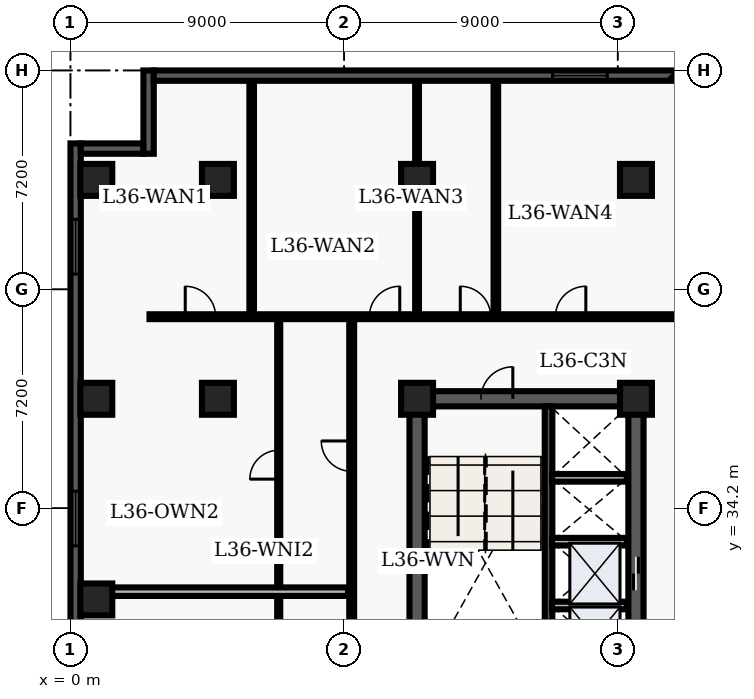
"""IFC4 building model, lengths in metres.
Left out: names, types, materials, properties, quantities, classifications, styles, units other than length and angle.
Written with IfcOpenShell. Run it as: python <this file> out.ifc"""

import sys

from ifc_helpers import new_model, entity, si_unit, converted_unit, direction, frame, origin_with_axes, origin_2d_with_axis, place, context, subcontext, project, spatial, polyline, rectangle, outline, extrude, element, fill, save


model = new_model("IFC4")
c1 = context("Model", 3, precision=1e-05, world=origin_with_axes(), true_north=direction((0.0, 1.0)))
c2 = subcontext(c1, "Body", "Model", "MODEL_VIEW")
j1 = project(units=[si_unit("LENGTHUNIT", "METRE"), converted_unit("PLANEANGLEUNIT", "DEGREE", entity("IfcPlaneAngleMeasure", 0.017), si_unit("PLANEANGLEUNIT", "RADIAN"), dimensions=[0, 0, 0, 0, 0, 0, 0])], contexts=[c1])
p1 = place(None, origin_with_axes())
s1 = spatial("IfcSite", under=j1, at=p1, CompositionType="ELEMENT")
p2 = place(p1, origin_with_axes())
s2 = spatial("IfcBuilding", under=s1, at=p2, CompositionType="ELEMENT")
p3 = place(p2, frame((0.0, 0.0, 148.5), z_axis=(0.0, 0.0, 1.0), x_axis=(1.0, 0.0, 0.0)))
s3 = spatial("IfcBuildingStorey", under=s2, at=p3, CompositionType="ELEMENT", Elevation=148.5)
p4 = place(p3, frame((11.4, 10.8, 0.0), z_axis=(0.0, 0.0, 1.0), x_axis=(0.0, 1.0, 0.0)))
e1 = element("IfcWall", 1, at=p4, inside=s3, PredefinedType="SHEAR", context=c2, shape_type="SweptSolid", body=[
    extrude(outline(polyline([(0.0, -0.25), (27.0, -0.25), (27.0, 0.25), (0.0, 0.25), (0.0, -0.25)])), origin_with_axes(), (0.0, 0.0, 1.0), 3.66),
])
p5 = place(p3, frame((11.4, 37.8, 0.0), z_axis=(0.0, 0.0, 1.0), x_axis=(1.0, 0.0, 0.0)))
e2 = element("IfcWall", 2, at=p5, inside=s3, PredefinedType="SHEAR", context=c2, shape_type="SweptSolid", body=[
    extrude(outline(polyline([(0.0, -0.25), (7.2, -0.25), (7.2, 0.25), (0.0, 0.25), (0.0, -0.25)])), origin_with_axes(), (0.0, 0.0, 1.0), 3.66),
])
p6 = place(p5, frame((2.625, 0.0, 0.0), z_axis=(0.0, 0.0, 1.0), x_axis=(1.0, 0.0, 0.0)))
e3 = element("IfcOpeningElement", 3, at=p6, cuts=e2, PredefinedType="OPENING", context=c2, shape_type="SweptSolid", body=[
    extrude(rectangle(XDim=1.05, YDim=0.52, at=origin_2d_with_axis()), origin_with_axes(), (0.0, 0.0, 1.0), 2.15),
])
p7 = place(p3, frame((18.6, 24.3, 0.0), z_axis=(0.0, 0.0, 1.0), x_axis=(0.0, 1.0, 0.0)))
e4 = element("IfcWall", 4, at=p7, inside=s3, PredefinedType="SHEAR", context=c2, shape_type="SweptSolid", body=[
    extrude(outline(polyline([(0.0, -0.25), (13.5, -0.25), (13.5, 0.25), (0.0, 0.25), (0.0, -0.25)])), origin_with_axes(), (0.0, 0.0, 1.0), 3.66),
])
p8 = place(p7, frame((5.65, 0.0, 0.0), z_axis=(0.0, 0.0, 1.0), x_axis=(1.0, 0.0, 0.0)))
e5 = element("IfcOpeningElement", 5, at=p8, cuts=e4, PredefinedType="OPENING", context=c2, shape_type="SweptSolid", body=[
    extrude(rectangle(XDim=1.1, YDim=0.52, at=origin_2d_with_axis()), origin_with_axes(), (0.0, 0.0, 1.0), 2.15),
])
p9 = place(p7, frame((7.75, 0.0, 0.0), z_axis=(0.0, 0.0, 1.0), x_axis=(1.0, 0.0, 0.0)))
e6 = element("IfcOpeningElement", 6, at=p9, cuts=e4, PredefinedType="OPENING", context=c2, shape_type="SweptSolid", body=[
    extrude(rectangle(XDim=1.1, YDim=0.52, at=origin_2d_with_axis()), origin_with_axes(), (0.0, 0.0, 1.0), 2.15),
])
p10 = place(p3, frame((15.725, 28.9, 0.0), z_axis=(0.0, 0.0, 1.0), x_axis=(0.0, 1.0, 0.0)))
e7 = element("IfcWall", 7, at=p10, inside=s3, PredefinedType="SHEAR", context=c2, shape_type="SweptSolid", body=[
    extrude(outline(polyline([(0.0, -0.125), (8.65, -0.125), (8.65, 0.125), (0.0, 0.125), (0.0, -0.125)])), origin_with_axes(), (0.0, 0.0, 1.0), 3.66),
])
for number, where, z_axis, x_axis in (
    (8, (11.4, 37.8, 0.0), (0.0, 0.0, 1.0), (1.0, 0.0, 0.0)),
    (9, (11.4, 45.0, 0.0), (0.0, 0.0, 1.0), (1.0, 0.0, 0.0)),
    (10, (18.6, 37.8, 0.0), (0.0, 0.0, 1.0), (1.0, 0.0, 0.0)),
    (11, (18.6, 45.0, 0.0), (0.0, 0.0, 1.0), (1.0, 0.0, 0.0)),
    (12, (4.85, 37.8, 0.0), (0.0, 0.0, 1.0), (1.0, 0.0, 0.0)),
    (13, (4.85, 45.0, 0.0), (0.0, 0.0, 1.0), (1.0, 0.0, 0.0)),
    (14, (0.85, 31.2, 0.0), (0.0, 0.0, 1.0), (1.0, 0.0, 0.0)),
    (15, (0.85, 37.8, 0.0), (0.0, 0.0, 1.0), (1.0, 0.0, 0.0)),
    (16, (0.85, 45.0, 0.0), (0.0, 0.0, 1.0), (1.0, 0.0, 0.0)),
):
    element("IfcColumn", number, at=place(p3, frame(where, z_axis=z_axis, x_axis=x_axis)), inside=s3, PredefinedType="COLUMN", context=c2, shape_type="SweptSolid", body=[
        extrude(rectangle(XDim=1.05, YDim=1.05, at=origin_2d_with_axis()), origin_with_axes(), (0.0, 0.0, 1.0), 3.9),
    ])
for number, where, z_axis, x_axis in (
    (17, (15.84, 31.0, 0.0), (0.0, 0.0, 1.0), (1.0, 0.0, 0.0)),
    (18, (15.84, 33.1, 0.0), (0.0, 0.0, 1.0), (1.0, 0.0, 0.0)),
    (19, (15.84, 35.2, 0.0), (0.0, 0.0, 1.0), (1.0, 0.0, 0.0)),
):
    element("IfcWall", number, at=place(p3, frame(where, z_axis=z_axis, x_axis=x_axis)), inside=s3, PredefinedType="SOLIDWALL", context=c2, shape_type="SweptSolid", body=[
        extrude(outline(polyline([(0.0, -0.125), (2.46, -0.125), (2.46, 0.125), (0.0, 0.125), (0.0, -0.125)])), origin_with_axes(), (0.0, 0.0, 1.0), 2.7),
    ])
p11 = place(p3, frame((2.6, 40.5, 0.0), z_axis=(0.0, 0.0, 1.0), x_axis=(1.0, 0.0, 0.0)))
e20 = element("IfcWall", 20, at=p11, inside=s3, PredefinedType="PARTITIONING", context=c2, shape_type="SweptSolid", body=[
    extrude(outline(polyline([(0.0, -0.08), (19.506, -0.08), (19.506, 0.08), (0.0, 0.08), (0.0, -0.08)])), origin_with_axes(), (0.0, 0.0, 1.0), 2.7),
])
p12 = place(p11, frame((1.675, 0.0, 0.0), z_axis=(0.0, 0.0, 1.0), x_axis=(1.0, 0.0, 0.0)))
e21 = element("IfcOpeningElement", 21, at=p12, cuts=e20, PredefinedType="OPENING", context=c2, shape_type="SweptSolid", body=[
    extrude(rectangle(XDim=1.0, YDim=0.18, at=origin_2d_with_axis()), origin_with_axes(), (0.0, 0.0, 1.0), 2.15),
])
p13 = place(p11, frame((7.731, 0.0, 0.0), z_axis=(0.0, 0.0, 1.0), x_axis=(1.0, 0.0, 0.0)))
e22 = element("IfcOpeningElement", 22, at=p13, cuts=e20, PredefinedType="OPENING", context=c2, shape_type="SweptSolid", body=[
    extrude(rectangle(XDim=1.0, YDim=0.18, at=origin_2d_with_axis()), origin_with_axes(), (0.0, 0.0, 1.0), 2.15),
])
p14 = place(p11, frame((10.722, 0.0, 0.0), z_axis=(0.0, 0.0, 1.0), x_axis=(1.0, 0.0, 0.0)))
e23 = element("IfcOpeningElement", 23, at=p14, cuts=e20, PredefinedType="OPENING", context=c2, shape_type="SweptSolid", body=[
    extrude(rectangle(XDim=1.0, YDim=0.18, at=origin_2d_with_axis()), origin_with_axes(), (0.0, 0.0, 1.0), 2.15),
])
p15 = place(p11, frame((13.851, 0.0, 0.0), z_axis=(0.0, 0.0, 1.0), x_axis=(1.0, 0.0, 0.0)))
e24 = element("IfcOpeningElement", 24, at=p15, cuts=e20, PredefinedType="OPENING", context=c2, shape_type="SweptSolid", body=[
    extrude(rectangle(XDim=1.0, YDim=0.18, at=origin_2d_with_axis()), origin_with_axes(), (0.0, 0.0, 1.0), 2.15),
])
p16 = place(p3, frame((9.25, 24.4, 0.0), z_axis=(0.0, 0.0, 1.0), x_axis=(0.0, 1.0, 0.0)))
e25 = element("IfcWall", 25, at=p16, inside=s3, PredefinedType="PARTITIONING", context=c2, shape_type="SweptSolid", body=[
    extrude(outline(polyline([(0.0, -0.08), (16.1, -0.08), (16.1, 0.08), (0.0, 0.08), (0.0, -0.08)])), origin_with_axes(), (0.0, 0.0, 1.0), 2.7),
])
p17 = place(p16, frame((3.567, 0.0, 0.0), z_axis=(0.0, 0.0, 1.0), x_axis=(1.0, 0.0, 0.0)))
e26 = element("IfcOpeningElement", 26, at=p17, cuts=e25, PredefinedType="OPENING", context=c2, shape_type="SweptSolid", body=[
    extrude(rectangle(XDim=1.0, YDim=0.18, at=origin_2d_with_axis()), origin_with_axes(), (0.0, 0.0, 1.0), 2.15),
])
p18 = place(p16, frame((11.512, 0.0, 0.0), z_axis=(0.0, 0.0, 1.0), x_axis=(1.0, 0.0, 0.0)))
e27 = element("IfcOpeningElement", 27, at=p18, cuts=e25, PredefinedType="OPENING", context=c2, shape_type="SweptSolid", body=[
    extrude(rectangle(XDim=1.0, YDim=0.18, at=origin_2d_with_axis()), origin_with_axes(), (0.0, 0.0, 1.0), 2.15),
])
p19 = place(p3, frame((6.85, 24.55, 0.0), z_axis=(0.0, 0.0, 1.0), x_axis=(0.0, 1.0, 0.0)))
e28 = element("IfcWall", 28, at=p19, inside=s3, PredefinedType="PARTITIONING", context=c2, shape_type="SweptSolid", body=[
    extrude(outline(polyline([(0.0, -0.05), (15.75, -0.05), (15.75, 0.05), (0.0, 0.05), (0.0, -0.05)])), origin_with_axes(), (0.0, 0.0, 1.0), 2.7),
])
p20 = place(p19, frame((3.417, 0.0, 0.0), z_axis=(0.0, 0.0, 1.0), x_axis=(1.0, 0.0, 0.0)))
e29 = element("IfcOpeningElement", 29, at=p20, cuts=e28, PredefinedType="OPENING", context=c2, shape_type="SweptSolid", body=[
    extrude(rectangle(XDim=0.95, YDim=0.12, at=origin_2d_with_axis()), origin_with_axes(), (0.0, 0.0, 1.0), 2.15),
])
p21 = place(p19, frame((11.082, 0.0, 0.0), z_axis=(0.0, 0.0, 1.0), x_axis=(1.0, 0.0, 0.0)))
e30 = element("IfcOpeningElement", 30, at=p21, cuts=e28, PredefinedType="OPENING", context=c2, shape_type="SweptSolid", body=[
    extrude(rectangle(XDim=0.95, YDim=0.12, at=origin_2d_with_axis()), origin_with_axes(), (0.0, 0.0, 1.0), 2.15),
])
p22 = place(p3, frame((0.335, 31.455, 0.0), z_axis=(0.0, 0.0, 1.0), x_axis=(1.0, 0.0, 0.0)))
e31 = element("IfcWall", 31, at=p22, inside=s3, PredefinedType="PARTITIONING", context=c2, shape_type="SweptSolid", body=[
    extrude(outline(polyline([(0.0, -0.14), (8.795, -0.14), (8.795, 0.14), (0.0, 0.14), (0.0, -0.14)])), origin_with_axes(), (0.0, 0.0, 1.0), 2.7),
])
p23 = place(p3, frame((5.961, 40.6, 0.0), z_axis=(0.0, 0.0, 1.0), x_axis=(0.0, 1.0, 0.0)))
e32 = element("IfcWall", 32, at=p23, inside=s3, PredefinedType="PARTITIONING", context=c2, shape_type="SweptSolid", body=[
    extrude(outline(polyline([(0.0, -0.075), (7.665, -0.075), (7.665, 0.075), (0.0, 0.075), (0.0, -0.075)])), origin_with_axes(), (0.0, 0.0, 1.0), 2.7),
])
p24 = place(p3, frame((11.4, 40.6, 0.0), z_axis=(0.0, 0.0, 1.0), x_axis=(0.0, 1.0, 0.0)))
e33 = element("IfcWall", 33, at=p24, inside=s3, PredefinedType="PARTITIONING", context=c2, shape_type="SweptSolid", body=[
    extrude(outline(polyline([(0.0, -0.062), (7.665, -0.062), (7.665, 0.062), (0.0, 0.062), (0.0, -0.062)])), origin_with_axes(), (0.0, 0.0, 1.0), 2.7),
])
p25 = place(p3, frame((13.992, 40.6, 0.0), z_axis=(0.0, 0.0, 1.0), x_axis=(0.0, 1.0, 0.0)))
e34 = element("IfcWall", 34, at=p25, inside=s3, PredefinedType="PARTITIONING", context=c2, shape_type="SweptSolid", body=[
    extrude(outline(polyline([(0.0, -0.075), (7.665, -0.075), (7.665, 0.075), (0.0, 0.075), (0.0, -0.075)])), origin_with_axes(), (0.0, 0.0, 1.0), 2.7),
])
p26 = place(p3, frame((0.17, 2.74, 0.0), z_axis=(0.0, 0.0, 1.0), x_axis=(0.0, 1.0, 0.0)))
e35 = element("IfcWall", 35, at=p26, inside=s3, PredefinedType="SOLIDWALL", context=c2, shape_type="SweptSolid", body=[
    extrude(outline(polyline([(0.0, -0.17), (43.46, -0.17), (43.46, 0.17), (0.0, 0.17), (0.0, -0.17)])), origin_with_axes(), (0.0, 0.0, 1.0), 3.66),
])
p27 = place(p26, frame((2.948, 0.0, 0.45), z_axis=(0.0, 0.0, 1.0), x_axis=(1.0, 0.0, 0.0)))
e36 = element("IfcOpeningElement", 36, at=p27, cuts=e35, PredefinedType="OPENING", context=c2, shape_type="SweptSolid", body=[
    extrude(rectangle(XDim=1.8, YDim=0.36, at=origin_2d_with_axis()), origin_with_axes(), (0.0, 0.0, 1.0), 2.1),
])
p28 = place(p26, frame((12.339, 0.0, 0.45), z_axis=(0.0, 0.0, 1.0), x_axis=(1.0, 0.0, 0.0)))
e37 = element("IfcOpeningElement", 37, at=p28, cuts=e35, PredefinedType="OPENING", context=c2, shape_type="SweptSolid", body=[
    extrude(rectangle(XDim=1.8, YDim=0.36, at=origin_2d_with_axis()), origin_with_axes(), (0.0, 0.0, 1.0), 2.1),
])
p29 = place(p26, frame((26.426, 0.0, 0.45), z_axis=(0.0, 0.0, 1.0), x_axis=(1.0, 0.0, 0.0)))
e38 = element("IfcOpeningElement", 38, at=p29, cuts=e35, PredefinedType="OPENING", context=c2, shape_type="SweptSolid", body=[
    extrude(rectangle(XDim=1.8, YDim=0.36, at=origin_2d_with_axis()), origin_with_axes(), (0.0, 0.0, 1.0), 2.1),
])
p30 = place(p26, frame((31.121, 0.0, 0.45), z_axis=(0.0, 0.0, 1.0), x_axis=(1.0, 0.0, 0.0)))
e39 = element("IfcOpeningElement", 39, at=p30, cuts=e35, PredefinedType="OPENING", context=c2, shape_type="SweptSolid", body=[
    extrude(rectangle(XDim=1.8, YDim=0.36, at=origin_2d_with_axis()), origin_with_axes(), (0.0, 0.0, 1.0), 2.1),
])
p31 = place(p26, frame((40.062, 0.0, 0.45), z_axis=(0.0, 0.0, 1.0), x_axis=(1.0, 0.0, 0.0)))
e40 = element("IfcOpeningElement", 40, at=p31, cuts=e35, PredefinedType="OPENING", context=c2, shape_type="SweptSolid", body=[
    extrude(rectangle(XDim=1.8, YDim=0.36, at=origin_2d_with_axis()), origin_with_axes(), (0.0, 0.0, 1.0), 2.1),
])
p32 = place(p3, frame((0.34, 46.03, 0.0), z_axis=(0.0, 0.0, 1.0), x_axis=(1.0, 0.0, 0.0)))
e41 = element("IfcWall", 41, at=p32, inside=s3, PredefinedType="SOLIDWALL", context=c2, shape_type="SweptSolid", body=[
    extrude(outline(polyline([(0.0, -0.17), (2.06, -0.17), (2.06, 0.17), (0.0, 0.17), (0.0, -0.17)])), origin_with_axes(), (0.0, 0.0, 1.0), 3.66),
])
p33 = place(p3, frame((2.57, 45.86, 0.0), z_axis=(0.0, 0.0, 1.0), x_axis=(0.0, 1.0, 0.0)))
e42 = element("IfcWall", 42, at=p33, inside=s3, PredefinedType="SOLIDWALL", context=c2, shape_type="SweptSolid", body=[
    extrude(outline(polyline([(0.0, -0.17), (2.74, -0.17), (2.74, 0.17), (0.0, 0.17), (0.0, -0.17)])), origin_with_axes(), (0.0, 0.0, 1.0), 3.66),
])
p34 = place(p3, frame((2.74, 48.43, 0.0), z_axis=(0.0, 0.0, 1.0), x_axis=(1.0, 0.0, 0.0)))
e43 = element("IfcWall", 43, at=p34, inside=s3, PredefinedType="SOLIDWALL", context=c2, shape_type="SweptSolid", body=[
    extrude(outline(polyline([(0.0, -0.17), (17.301, -0.17), (17.301, 0.17), (0.0, 0.17), (0.0, -0.17)])), origin_with_axes(), (0.0, 0.0, 1.0), 3.66),
])
p35 = place(p34, frame((14.018, 0.0, 0.45), z_axis=(0.0, 0.0, 1.0), x_axis=(1.0, 0.0, 0.0)))
e44 = element("IfcOpeningElement", 44, at=p35, cuts=e43, PredefinedType="OPENING", context=c2, shape_type="SweptSolid", body=[
    extrude(rectangle(XDim=1.8, YDim=0.36, at=origin_2d_with_axis()), origin_with_axes(), (0.0, 0.0, 1.0), 2.1),
])
p36 = place(p3, frame((19.907, 48.494, 0.0), z_axis=(0.0, 0.0, 1.0), x_axis=(0.707107, -0.707107, 0.0)))
e45 = element("IfcWall", 45, at=p36, inside=s3, PredefinedType="SOLIDWALL", context=c2, shape_type="SweptSolid", body=[
    extrude(outline(polyline([(0.0, -0.17), (3.414, -0.17), (3.414, 0.17), (0.0, 0.17), (0.0, -0.17)])), origin_with_axes(), (0.0, 0.0, 1.0), 3.66),
])
p37 = place(p7, frame((7.75, 0.0, 0.0), z_axis=(0.0, 0.0, 1.0), x_axis=(1.0, 0.0, 0.0)))
e46 = element("IfcDoor", 46, at=p37, inside=s3, OperationType="SLIDING_TO_RIGHT", PredefinedType="DOOR", context=c2, shape_type="SweptSolid", body=[
    extrude(rectangle(XDim=1.1, YDim=0.09, at=origin_2d_with_axis()), origin_with_axes(), (0.0, 0.0, 1.0), 2.15),
])
fill(e6, e46)
p38 = place(p5, frame((2.625, 0.0, 0.0), z_axis=(0.0, 0.0, 1.0), x_axis=(1.0, 0.0, 0.0)))
e47 = element("IfcDoor", 47, at=p38, inside=s3, OperationType="SINGLE_SWING_RIGHT", PredefinedType="DOOR", context=c2, shape_type="SweptSolid", body=[
    extrude(rectangle(XDim=1.05, YDim=0.09, at=origin_2d_with_axis()), origin_with_axes(), (0.0, 0.0, 1.0), 2.15),
])
fill(e3, e47)
p39 = place(p19, frame((11.082, 0.0, 0.0), z_axis=(0.0, 0.0, 1.0), x_axis=(1.0, 0.0, 0.0)))
e48 = element("IfcDoor", 48, at=p39, inside=s3, OperationType="SINGLE_SWING_LEFT", PredefinedType="DOOR", context=c2, shape_type="SweptSolid", body=[
    extrude(rectangle(XDim=0.95, YDim=0.06, at=origin_2d_with_axis()), origin_with_axes(), (0.0, 0.0, 1.0), 2.15),
])
fill(e30, e48)
p40 = place(p16, frame((11.512, 0.0, 0.0), z_axis=(0.0, 0.0, 1.0), x_axis=(1.0, 0.0, 0.0)))
e49 = element("IfcDoor", 49, at=p40, inside=s3, OperationType="SINGLE_SWING_RIGHT", PredefinedType="DOOR", context=c2, shape_type="SweptSolid", body=[
    extrude(rectangle(XDim=1.0, YDim=0.09, at=origin_2d_with_axis()), origin_with_axes(), (0.0, 0.0, 1.0), 2.15),
])
fill(e27, e49)
p41 = place(p11, frame((1.675, 0.0, 0.0), z_axis=(0.0, 0.0, 1.0), x_axis=(1.0, 0.0, 0.0)))
e50 = element("IfcDoor", 50, at=p41, inside=s3, OperationType="SINGLE_SWING_LEFT", PredefinedType="DOOR", context=c2, shape_type="SweptSolid", body=[
    extrude(rectangle(XDim=1.0, YDim=0.09, at=origin_2d_with_axis()), origin_with_axes(), (0.0, 0.0, 1.0), 2.15),
])
fill(e21, e50)
p42 = place(p11, frame((7.731, 0.0, 0.0), z_axis=(0.0, 0.0, 1.0), x_axis=(1.0, 0.0, 0.0)))
e51 = element("IfcDoor", 51, at=p42, inside=s3, OperationType="SINGLE_SWING_RIGHT", PredefinedType="DOOR", context=c2, shape_type="SweptSolid", body=[
    extrude(rectangle(XDim=1.0, YDim=0.09, at=origin_2d_with_axis()), origin_with_axes(), (0.0, 0.0, 1.0), 2.15),
])
fill(e22, e51)
p43 = place(p11, frame((10.722, 0.0, 0.0), z_axis=(0.0, 0.0, 1.0), x_axis=(1.0, 0.0, 0.0)))
e52 = element("IfcDoor", 52, at=p43, inside=s3, OperationType="SINGLE_SWING_LEFT", PredefinedType="DOOR", context=c2, shape_type="SweptSolid", body=[
    extrude(rectangle(XDim=1.0, YDim=0.09, at=origin_2d_with_axis()), origin_with_axes(), (0.0, 0.0, 1.0), 2.15),
])
fill(e23, e52)
p44 = place(p11, frame((13.851, 0.0, 0.0), z_axis=(0.0, 0.0, 1.0), x_axis=(1.0, 0.0, 0.0)))
e53 = element("IfcDoor", 53, at=p44, inside=s3, OperationType="SINGLE_SWING_RIGHT", PredefinedType="DOOR", context=c2, shape_type="SweptSolid", body=[
    extrude(rectangle(XDim=1.0, YDim=0.09, at=origin_2d_with_axis()), origin_with_axes(), (0.0, 0.0, 1.0), 2.15),
])
fill(e24, e53)
p45 = place(p26, frame((31.121, 0.0, 0.45), z_axis=(0.0, 0.0, 1.0), x_axis=(1.0, 0.0, 0.0)))
e54 = element("IfcWindow", 54, at=p45, inside=s3, PredefinedType="WINDOW", context=c2, shape_type="SweptSolid", body=[
    extrude(rectangle(XDim=1.8, YDim=0.09, at=origin_2d_with_axis()), origin_with_axes(), (0.0, 0.0, 1.0), 2.1),
])
fill(e39, e54)
p46 = place(p26, frame((40.062, 0.0, 0.45), z_axis=(0.0, 0.0, 1.0), x_axis=(1.0, 0.0, 0.0)))
e55 = element("IfcWindow", 55, at=p46, inside=s3, PredefinedType="WINDOW", context=c2, shape_type="SweptSolid", body=[
    extrude(rectangle(XDim=1.8, YDim=0.09, at=origin_2d_with_axis()), origin_with_axes(), (0.0, 0.0, 1.0), 2.1),
])
fill(e40, e55)
p47 = place(p34, frame((14.018, 0.0, 0.45), z_axis=(0.0, 0.0, 1.0), x_axis=(1.0, 0.0, 0.0)))
e56 = element("IfcWindow", 56, at=p47, inside=s3, PredefinedType="WINDOW", context=c2, shape_type="SweptSolid", body=[
    extrude(rectangle(XDim=1.8, YDim=0.09, at=origin_2d_with_axis()), origin_with_axes(), (0.0, 0.0, 1.0), 2.1),
])
fill(e44, e56)
save(model, sys.argv[1])
